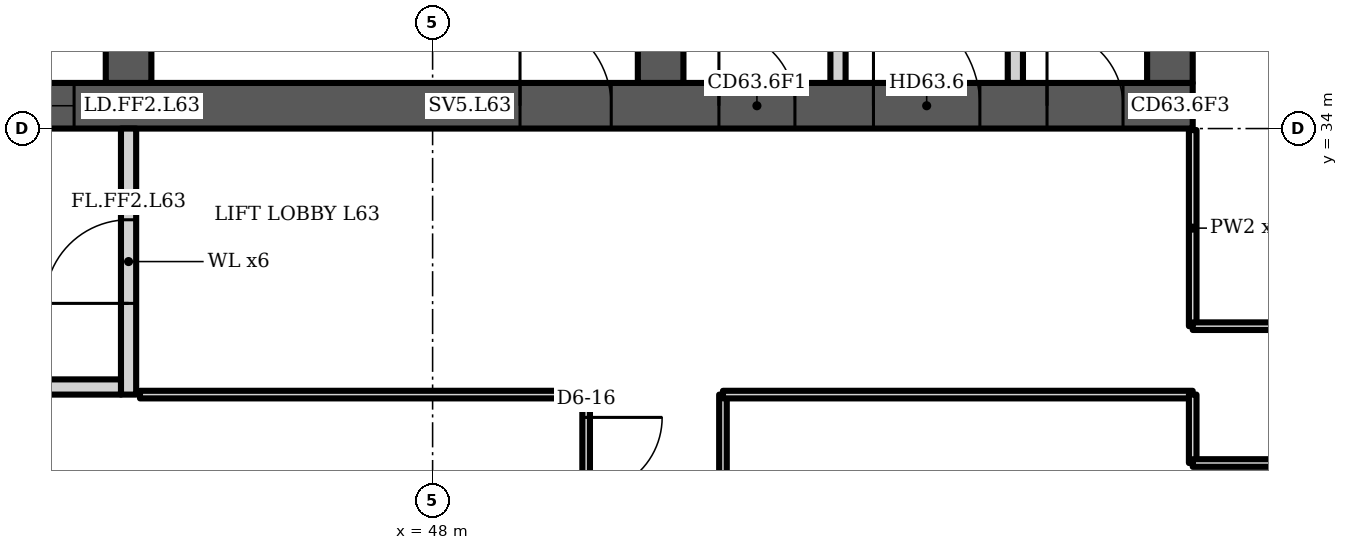
"""IFC4 building model, lengths in metres.
Left out: names, types, materials, properties, quantities, classifications, styles, units other than length and angle.
Written with IfcOpenShell. Run it as: python <this file> out.ifc"""

import sys

from ifc_helpers import new_model, si_unit, direction, frame, frame_2d, origin, place, context, subcontext, project, spatial, polyline, rectangle, outline, extrude, element, fill, save


model = new_model("IFC4")
c1 = context("Model", 3, precision=1e-05, world=origin(), true_north=direction((0.0, 1.0)))
c2 = subcontext(c1, "Body", "Model", "MODEL_VIEW")
j1 = project(units=[si_unit("LENGTHUNIT", "METRE"), si_unit("PLANEANGLEUNIT", "RADIAN")], contexts=[c1])
p1 = place(None, origin())
s1 = spatial("IfcSite", under=j1, at=p1, CompositionType="ELEMENT")
p2 = place(p1, origin())
s2 = spatial("IfcBuilding", under=s1, at=p2, CompositionType="ELEMENT")
p3 = place(p2, frame((0.0, 0.0, 250.3)))
s3 = spatial("IfcBuildingStorey", under=s2, at=p3, CompositionType="ELEMENT", Elevation=250.3)
p4 = place(p3, frame((23.0, 34.3, 0.0), z_axis=(0.0, 0.0, 1.0), x_axis=(1.0, 0.0, 0.0)))
e1 = element("IfcWall", 1, at=p4, inside=s3, PredefinedType="SHEAR", context=c2, shape_type="SweptSolid", body=[
    extrude(rectangle(XDim=35.0, YDim=0.6, at=frame_2d((17.5, 0.0))), origin(), (0.0, 0.0, 1.0), 3.6),
])
p5 = place(p4, frame((0.65, 0.0, 0.0)))
e2 = element("IfcOpeningElement", 2, at=p5, cuts=e1, PredefinedType="OPENING", context=c2, shape_type="SweptSolid", body=[
    extrude(rectangle(XDim=1.2, YDim=2.1, at=frame_2d((0.6, 1.05))), frame((0.0, 0.31, 0.0), z_axis=(0.0, -1.0, 0.0), x_axis=(1.0, 0.0, 0.0)), (0.0, 0.0, 1.0), 0.62),
])
p6 = place(p4, frame((7.717, 0.0, 0.0)))
e3 = element("IfcOpeningElement", 3, at=p6, cuts=e1, PredefinedType="OPENING", context=c2, shape_type="SweptSolid", body=[
    extrude(rectangle(XDim=1.1, YDim=2.1, at=frame_2d((0.55, 1.05))), frame((0.0, 0.31, 0.0), z_axis=(0.0, -1.0, 0.0), x_axis=(1.0, 0.0, 0.0)), (0.0, 0.0, 1.0), 0.62),
])
p7 = place(p4, frame((12.183, 0.0, 0.0)))
e4 = element("IfcOpeningElement", 4, at=p7, cuts=e1, PredefinedType="OPENING", context=c2, shape_type="SweptSolid", body=[
    extrude(rectangle(XDim=1.1, YDim=2.1, at=frame_2d((0.55, 1.05))), frame((0.0, 0.31, 0.0), z_axis=(0.0, -1.0, 0.0), x_axis=(1.0, 0.0, 0.0)), (0.0, 0.0, 1.0), 0.62),
])
p8 = place(p4, frame((9.8, 0.0, 0.0)))
e5 = element("IfcOpeningElement", 5, at=p8, cuts=e1, PredefinedType="OPENING", context=c2, shape_type="SweptSolid", body=[
    extrude(rectangle(XDim=1.4, YDim=2.1, at=frame_2d((0.7, 1.05))), frame((0.0, 0.31, 0.0), z_axis=(0.0, -1.0, 0.0), x_axis=(1.0, 0.0, 0.0)), (0.0, 0.0, 1.0), 0.62),
])
p9 = place(p4, frame((14.717, 0.0, 0.0)))
e6 = element("IfcOpeningElement", 6, at=p9, cuts=e1, PredefinedType="OPENING", context=c2, shape_type="SweptSolid", body=[
    extrude(rectangle(XDim=1.1, YDim=2.1, at=frame_2d((0.55, 1.05))), frame((0.0, 0.31, 0.0), z_axis=(0.0, -1.0, 0.0), x_axis=(1.0, 0.0, 0.0)), (0.0, 0.0, 1.0), 0.62),
])
p10 = place(p4, frame((16.95, 0.0, 0.0)))
e7 = element("IfcOpeningElement", 7, at=p10, cuts=e1, PredefinedType="OPENING", context=c2, shape_type="SweptSolid", body=[
    extrude(rectangle(XDim=1.1, YDim=2.1, at=frame_2d((0.55, 1.05))), frame((0.0, 0.31, 0.0), z_axis=(0.0, -1.0, 0.0), x_axis=(1.0, 0.0, 0.0)), (0.0, 0.0, 1.0), 0.62),
])
p11 = place(p4, frame((19.183, 0.0, 0.0)))
e8 = element("IfcOpeningElement", 8, at=p11, cuts=e1, PredefinedType="OPENING", context=c2, shape_type="SweptSolid", body=[
    extrude(rectangle(XDim=1.1, YDim=2.1, at=frame_2d((0.55, 1.05))), frame((0.0, 0.31, 0.0), z_axis=(0.0, -1.0, 0.0), x_axis=(1.0, 0.0, 0.0)), (0.0, 0.0, 1.0), 0.62),
])
p12 = place(p4, frame((26.15, 0.0, 0.0)))
e9 = element("IfcOpeningElement", 9, at=p12, cuts=e1, PredefinedType="OPENING", context=c2, shape_type="SweptSolid", body=[
    extrude(rectangle(XDim=1.2, YDim=2.1, at=frame_2d((0.6, 1.05))), frame((0.0, 0.31, 0.0), z_axis=(0.0, -1.0, 0.0), x_axis=(1.0, 0.0, 0.0)), (0.0, 0.0, 1.0), 0.62),
])
p13 = place(p4, frame((28.767, 0.0, 0.0)))
e10 = element("IfcOpeningElement", 10, at=p13, cuts=e1, PredefinedType="OPENING", context=c2, shape_type="SweptSolid", body=[
    extrude(rectangle(XDim=1.0, YDim=2.1, at=frame_2d((0.5, 1.05))), frame((0.0, 0.31, 0.0), z_axis=(0.0, -1.0, 0.0), x_axis=(1.0, 0.0, 0.0)), (0.0, 0.0, 1.0), 0.62),
])
p14 = place(p4, frame((33.083, 0.0, 0.0)))
e11 = element("IfcOpeningElement", 11, at=p14, cuts=e1, PredefinedType="OPENING", context=c2, shape_type="SweptSolid", body=[
    extrude(rectangle(XDim=1.0, YDim=2.1, at=frame_2d((0.5, 1.05))), frame((0.0, 0.31, 0.0), z_axis=(0.0, -1.0, 0.0), x_axis=(1.0, 0.0, 0.0)), (0.0, 0.0, 1.0), 0.62),
])
p15 = place(p4, frame((30.8, 0.0, 0.0)))
e12 = element("IfcOpeningElement", 12, at=p15, cuts=e1, PredefinedType="OPENING", context=c2, shape_type="SweptSolid", body=[
    extrude(rectangle(XDim=1.4, YDim=2.1, at=frame_2d((0.7, 1.05))), frame((0.0, 0.31, 0.0), z_axis=(0.0, -1.0, 0.0), x_axis=(1.0, 0.0, 0.0)), (0.0, 0.0, 1.0), 0.62),
])
p16 = place(p3, frame((44.0, 34.6, 0.0), z_axis=(0.0, 0.0, 1.0), x_axis=(0.0, 1.0, 0.0)))
e13 = element("IfcWall", 13, at=p16, inside=s3, PredefinedType="SHEAR", context=c2, shape_type="SweptSolid", body=[
    extrude(rectangle(XDim=14.784, YDim=0.6, at=frame_2d((7.392, 0.0))), origin(), (0.0, 0.0, 1.0), 3.6),
])
p17 = place(p16, frame((11.608, 0.0, 0.0)))
e14 = element("IfcOpeningElement", 14, at=p17, cuts=e13, PredefinedType="OPENING", context=c2, shape_type="SweptSolid", body=[
    extrude(rectangle(XDim=1.0, YDim=2.1, at=frame_2d((0.5, 1.05))), frame((0.0, 0.31, 0.0), z_axis=(0.0, -1.0, 0.0), x_axis=(1.0, 0.0, 0.0)), (0.0, 0.0, 1.0), 0.62),
])
p18 = place(p16, frame((3.8, 0.0, 0.0)))
e15 = element("IfcOpeningElement", 15, at=p18, cuts=e13, PredefinedType="OPENING", context=c2, shape_type="SweptSolid", body=[
    extrude(rectangle(XDim=1.1, YDim=2.1, at=frame_2d((0.55, 1.05))), frame((0.0, 0.31, 0.0), z_axis=(0.0, -1.0, 0.0), x_axis=(1.0, 0.0, 0.0)), (0.0, 0.0, 1.0), 0.62),
])
p19 = place(p3, frame((51.0, 34.6, 0.0), z_axis=(0.0, 0.0, 1.0), x_axis=(0.0, 1.0, 0.0)))
e16 = element("IfcWall", 16, at=p19, inside=s3, PredefinedType="SHEAR", context=c2, shape_type="SweptSolid", body=[
    extrude(rectangle(XDim=14.171, YDim=0.6, at=frame_2d((7.085, 0.0))), origin(), (0.0, 0.0, 1.0), 3.6),
])
p20 = place(p19, frame((3.8, 0.0, 0.0)))
e17 = element("IfcOpeningElement", 17, at=p20, cuts=e16, PredefinedType="OPENING", context=c2, shape_type="SweptSolid", body=[
    extrude(rectangle(XDim=1.1, YDim=2.1, at=frame_2d((0.55, 1.05))), frame((0.0, 0.31, 0.0), z_axis=(0.0, -1.0, 0.0), x_axis=(1.0, 0.0, 0.0)), (0.0, 0.0, 1.0), 0.62),
])
p21 = place(p3, frame((57.7, 34.6, 0.0), z_axis=(0.0, 0.0, 1.0), x_axis=(0.0, 1.0, 0.0)))
e18 = element("IfcWall", 18, at=p21, inside=s3, PredefinedType="SHEAR", context=c2, shape_type="SweptSolid", body=[
    extrude(rectangle(XDim=13.585, YDim=0.6, at=frame_2d((6.792, 0.0))), origin(), (0.0, 0.0, 1.0), 3.6),
])
p22 = place(p3, frame((0.0, 0.0, -0.0)))
e19 = element("IfcWall", 19, at=p22, inside=s3, PredefinedType="PARTITIONING", context=c2, shape_type="SweptSolid", body=[
    extrude(outline(polyline([(41.567, 37.1), (39.433, 37.1), (39.433, 34.6), (39.233, 34.6), (39.233, 37.45), (37.3, 37.45), (37.3, 37.65), (39.233, 37.65), (39.433, 37.65), (39.433, 37.3), (41.567, 37.3), (41.567, 37.35), (41.767, 37.35), (43.7, 37.35), (43.7, 37.15), (41.767, 37.15), (41.767, 34.6), (41.567, 34.6), (41.567, 37.1)])), origin(), (0.0, 0.0, 1.0), 3.2),
])
p23 = place(p3, frame((0.0, 0.0, -0.0)))
e20 = element("IfcWall", 20, at=p23, inside=s3, PredefinedType="PARTITIONING", context=c2, shape_type="SweptSolid", body=[
    extrude(outline(polyline([(53.233, 34.6), (53.233, 37.3), (53.433, 37.3), (53.433, 34.6), (53.233, 34.6)])), origin(), (0.0, 0.0, 1.0), 3.2),
])
p24 = place(p3, frame((0.0, 0.0, -0.0)))
e21 = element("IfcWall", 21, at=p24, inside=s3, PredefinedType="PARTITIONING", context=c2, shape_type="SweptSolid", body=[
    extrude(outline(polyline([(55.567, 34.6), (55.567, 37.3), (55.767, 37.3), (55.767, 34.6), (55.567, 34.6)])), origin(), (0.0, 0.0, 1.0), 3.2),
])
p25 = place(p3, frame((44.0, 30.5, 0.0), z_axis=(0.0, 0.0, 1.0), x_axis=(0.0, 1.0, 0.0)))
e22 = element("IfcWall", 22, at=p25, inside=s3, PredefinedType="PARTITIONING", context=c2, shape_type="SweptSolid", body=[
    extrude(rectangle(XDim=3.5, YDim=0.2, at=frame_2d((1.75, 0.0))), origin(), (0.0, 0.0, 1.0), 3.2),
])
p26 = place(p25, frame((1.2, 0.0, 0.0)))
e23 = element("IfcOpeningElement", 23, at=p26, cuts=e22, PredefinedType="OPENING", context=c2, shape_type="SweptSolid", body=[
    extrude(rectangle(XDim=1.1, YDim=2.1, at=frame_2d((0.55, 1.05))), frame((0.0, 0.11, 0.0), z_axis=(0.0, -1.0, 0.0), x_axis=(1.0, 0.0, 0.0)), (0.0, 0.0, 1.0), 0.22),
])
p27 = place(p3, frame((41.1, 30.6, 0.0), z_axis=(0.0, 0.0, 1.0), x_axis=(1.0, 0.0, 0.0)))
e24 = element("IfcWall", 24, at=p27, inside=s3, PredefinedType="PARTITIONING", context=c2, shape_type="SweptSolid", body=[
    extrude(rectangle(XDim=2.8, YDim=0.2, at=frame_2d((1.4, 0.0))), origin(), (0.0, 0.0, 1.0), 3.2),
])
p28 = place(p3, frame((50.02, 15.245, 0.0), z_axis=(0.0, 0.0, 1.0), x_axis=(0.0, 1.0, 0.0)))
e25 = element("IfcWall", 25, at=p28, inside=s3, PredefinedType="PARTITIONING", context=c2, shape_type="SweptSolid", body=[
    extrude(rectangle(XDim=15.255, YDim=0.1, at=frame_2d((7.627, 0.0))), origin(), (0.0, 0.0, 1.0), 3.2),
])
p29 = place(p28, frame((13.955, 0.0, 0.0)))
e26 = element("IfcOpeningElement", 26, at=p29, cuts=e25, PredefinedType="OPENING", context=c2, shape_type="SweptSolid", body=[
    extrude(rectangle(XDim=1.0, YDim=2.1, at=frame_2d((0.5, 1.05))), frame((0.0, 0.06, 0.0), z_axis=(0.0, -1.0, 0.0), x_axis=(1.0, 0.0, 0.0)), (0.0, 0.0, 1.0), 0.12),
])
p30 = place(p3, frame((51.82, 3.717, 0.0), z_axis=(0.0, 0.0, 1.0), x_axis=(0.0, 1.0, 0.0)))
e27 = element("IfcWall", 27, at=p30, inside=s3, PredefinedType="PARTITIONING", context=c2, shape_type="SweptSolid", body=[
    extrude(rectangle(XDim=26.783, YDim=0.1, at=frame_2d((13.391, 0.0))), origin(), (0.0, 0.0, 1.0), 2.58),
])
p31 = place(p30, frame((2.798, 0.0, 0.0)))
e28 = element("IfcOpeningElement", 28, at=p31, cuts=e27, PredefinedType="OPENING", context=c2, shape_type="SweptSolid", body=[
    extrude(rectangle(XDim=1.0, YDim=2.1, at=frame_2d((0.5, 1.05))), frame((0.0, 0.06, 0.0), z_axis=(0.0, -1.0, 0.0), x_axis=(1.0, 0.0, 0.0)), (0.0, 0.0, 1.0), 0.12),
])
p32 = place(p30, frame((9.453, 0.0, 0.0)))
e29 = element("IfcOpeningElement", 29, at=p32, cuts=e27, PredefinedType="OPENING", context=c2, shape_type="SweptSolid", body=[
    extrude(rectangle(XDim=1.0, YDim=2.1, at=frame_2d((0.5, 1.05))), frame((0.0, 0.06, 0.0), z_axis=(0.0, -1.0, 0.0), x_axis=(1.0, 0.0, 0.0)), (0.0, 0.0, 1.0), 0.12),
])
p33 = place(p3, frame((51.82, 30.5, 0.0), z_axis=(0.0, 0.0, 1.0), x_axis=(1.0, 0.0, 0.0)))
e30 = element("IfcWall", 30, at=p33, inside=s3, PredefinedType="PARTITIONING", context=c2, shape_type="SweptSolid", body=[
    extrude(rectangle(XDim=6.18, YDim=0.1, at=frame_2d((3.09, 0.0))), origin(), (0.0, 0.0, 1.0), 3.2),
])
p34 = place(p3, frame((58.0, 29.6, 0.0), z_axis=(0.0, 0.0, 1.0), x_axis=(0.0, 1.0, 0.0)))
e31 = element("IfcWall", 31, at=p34, inside=s3, PredefinedType="PARTITIONING", context=c2, shape_type="SweptSolid", body=[
    extrude(rectangle(XDim=0.9, YDim=0.1, at=frame_2d((0.45, 0.0))), origin(), (0.0, 0.0, 1.0), 3.2),
])
p35 = place(p3, frame((58.0, 29.6, 0.0), z_axis=(0.0, 0.0, 1.0), x_axis=(1.0, 0.0, 0.0)))
e32 = element("IfcWall", 32, at=p35, inside=s3, PredefinedType="PARTITIONING", context=c2, shape_type="SweptSolid", body=[
    extrude(rectangle(XDim=6.17, YDim=0.1, at=frame_2d((3.085, 0.0))), origin(), (0.0, 0.0, 1.0), 3.2),
])
p36 = place(p3, frame((58.0, 31.4, 0.0), z_axis=(0.0, 0.0, 1.0), x_axis=(0.0, 1.0, 0.0)))
e33 = element("IfcWall", 33, at=p36, inside=s3, PredefinedType="PARTITIONING", context=c2, shape_type="SweptSolid", body=[
    extrude(rectangle(XDim=2.58, YDim=0.1, at=frame_2d((1.29, 0.0))), origin(), (0.0, 0.0, 1.0), 3.2),
])
p37 = place(p3, frame((58.0, 31.4, 0.0), z_axis=(0.0, 0.0, 1.0), x_axis=(1.0, 0.0, 0.0)))
e34 = element("IfcWall", 34, at=p37, inside=s3, PredefinedType="PARTITIONING", context=c2, shape_type="SweptSolid", body=[
    extrude(rectangle(XDim=7.97, YDim=0.1, at=frame_2d((3.985, 0.0))), origin(), (0.0, 0.0, 1.0), 3.2),
])
p38 = place(p37, frame((2.15, 0.0, 0.0)))
e35 = element("IfcOpeningElement", 35, at=p38, cuts=e34, PredefinedType="OPENING", context=c2, shape_type="SweptSolid", body=[
    extrude(rectangle(XDim=1.0, YDim=2.1, at=frame_2d((0.5, 1.05))), frame((0.0, 0.06, 0.0), z_axis=(0.0, -1.0, 0.0), x_axis=(1.0, 0.0, 0.0)), (0.0, 0.0, 1.0), 0.12),
])
p39 = place(p3, frame((44.15, 30.5, 0.0), z_axis=(0.0, 0.0, 1.0), x_axis=(1.0, 0.0, 0.0)))
e36 = element("IfcWall", 36, at=p39, inside=s3, PredefinedType="PARTITIONING", context=c2, shape_type="SweptSolid", body=[
    extrude(rectangle(XDim=5.87, YDim=0.1, at=frame_2d((2.935, 0.0))), origin(), (0.0, 0.0, 1.0), 3.2),
])
p40 = place(p11, origin())
e37 = element("IfcDoor", 37, at=p40, inside=s3, OperationType="DOUBLE_DOOR_SLIDING", PredefinedType="DOOR", context=c2, shape_type="SweptSolid", body=[
    extrude(rectangle(XDim=1.1, YDim=2.1, at=frame_2d((0.55, 1.05))), frame((0.0, 0.025, 0.0), z_axis=(0.0, -1.0, 0.0), x_axis=(1.0, 0.0, 0.0)), (0.0, 0.0, 1.0), 0.05),
])
fill(e8, e37)
p41 = place(p12, origin())
e38 = element("IfcDoor", 38, at=p41, inside=s3, OperationType="SINGLE_SWING_LEFT", PredefinedType="DOOR", context=c2, shape_type="SweptSolid", body=[
    extrude(rectangle(XDim=1.2, YDim=2.1, at=frame_2d((0.6, 1.05))), frame((0.0, 0.025, 0.0), z_axis=(0.0, -1.0, 0.0), x_axis=(1.0, 0.0, 0.0)), (0.0, 0.0, 1.0), 0.05),
])
fill(e9, e38)
p42 = place(p13, origin())
e39 = element("IfcDoor", 39, at=p42, inside=s3, OperationType="SINGLE_SWING_LEFT", PredefinedType="DOOR", context=c2, shape_type="SweptSolid", body=[
    extrude(rectangle(XDim=1.0, YDim=2.1, at=frame_2d((0.5, 1.05))), frame((0.0, 0.025, 0.0), z_axis=(0.0, -1.0, 0.0), x_axis=(1.0, 0.0, 0.0)), (0.0, 0.0, 1.0), 0.05),
])
fill(e10, e39)
p43 = place(p14, origin())
e40 = element("IfcDoor", 40, at=p43, inside=s3, OperationType="SINGLE_SWING_LEFT", PredefinedType="DOOR", context=c2, shape_type="SweptSolid", body=[
    extrude(rectangle(XDim=1.0, YDim=2.1, at=frame_2d((0.5, 1.05))), frame((0.0, 0.025, 0.0), z_axis=(0.0, -1.0, 0.0), x_axis=(1.0, 0.0, 0.0)), (0.0, 0.0, 1.0), 0.05),
])
fill(e11, e40)
p44 = place(p15, origin())
e41 = element("IfcDoor", 41, at=p44, inside=s3, OperationType="DOUBLE_DOOR_SINGLE_SWING", PredefinedType="DOOR", context=c2, shape_type="SweptSolid", body=[
    extrude(rectangle(XDim=1.4, YDim=2.1, at=frame_2d((0.7, 1.05))), frame((0.0, 0.025, 0.0), z_axis=(0.0, -1.0, 0.0), x_axis=(1.0, 0.0, 0.0)), (0.0, 0.0, 1.0), 0.05),
])
fill(e12, e41)
p45 = place(p26, origin())
e42 = element("IfcDoor", 42, at=p45, inside=s3, OperationType="SINGLE_SWING_LEFT", PredefinedType="DOOR", context=c2, shape_type="SweptSolid", body=[
    extrude(rectangle(XDim=1.1, YDim=2.1, at=frame_2d((0.55, 1.05))), frame((0.0, 0.025, 0.0), z_axis=(0.0, -1.0, 0.0), x_axis=(1.0, 0.0, 0.0)), (0.0, 0.0, 1.0), 0.05),
])
fill(e23, e42)
p46 = place(p29, origin())
e43 = element("IfcDoor", 43, at=p46, inside=s3, OperationType="SINGLE_SWING_RIGHT", PredefinedType="DOOR", context=c2, shape_type="SweptSolid", body=[
    extrude(rectangle(XDim=1.0, YDim=2.1, at=frame_2d((0.5, 1.05))), frame((0.0, 0.025, 0.0), z_axis=(0.0, -1.0, 0.0), x_axis=(1.0, 0.0, 0.0)), (0.0, 0.0, 1.0), 0.05),
])
fill(e26, e43)
save(model, sys.argv[1])
